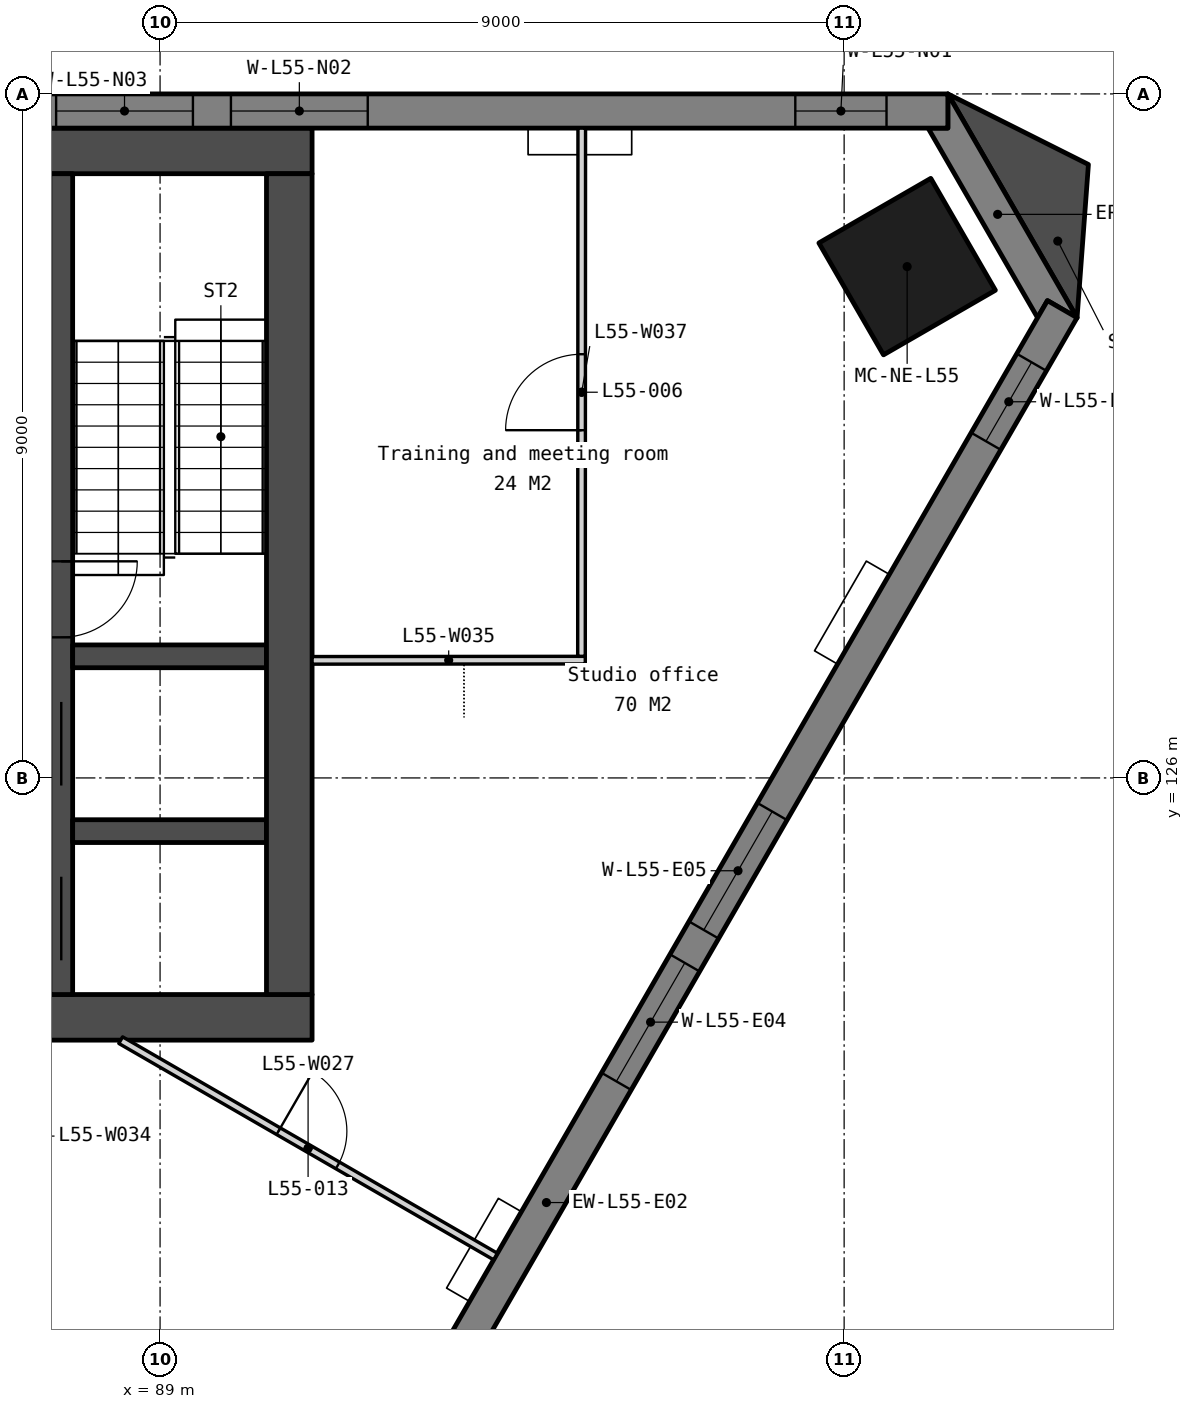
"""IFC4 building model, lengths in metres.
Left out: names, types, materials, properties, quantities, classifications, styles, units other than length and angle.
Written with IfcOpenShell. Run it as: python <this file> out.ifc"""

import sys

from ifc_helpers import new_model, si_unit, direction, frame, frame_2d, origin, origin_2d, place, context, subcontext, project, spatial, polyline, rectangle, outline, extrude, element, fill, save


model = new_model("IFC4")
c1 = context("Model", 3, precision=1e-05, world=origin(), true_north=direction((0.0, 1.0)))
c2 = subcontext(c1, "Body", "Model", "MODEL_VIEW")
j1 = project(units=[si_unit("LENGTHUNIT", "METRE"), si_unit("PLANEANGLEUNIT", "RADIAN")], contexts=[c1])
p1 = place(None, origin())
s1 = spatial("IfcSite", under=j1, at=p1, CompositionType="ELEMENT")
p2 = place(p1, origin())
s2 = spatial("IfcBuilding", under=s1, at=p2, CompositionType="ELEMENT")
p3 = place(p2, frame((0.0, 0.0, 219.2)))
s3 = spatial("IfcBuildingStorey", under=s2, at=p3, CompositionType="ELEMENT", Elevation=219.2)
p4 = place(p3, frame((98.829, 132.728, 0.0), z_axis=(0.0, 0.0, 1.0), x_axis=(-0.5, 0.866025403784, 0.0)))
e1 = element("IfcColumn", 1, at=p4, inside=s3, PredefinedType="COLUMN", context=c2, shape_type="SweptSolid", body=[
    extrude(rectangle(XDim=1.7, YDim=1.7, at=origin_2d()), origin(), (0.0, 0.0, 1.0), 3.9),
])
p5 = place(p3, frame((69.0, 134.25, 0.0), z_axis=(0.0, 0.0, 1.0), x_axis=(1.0, 0.0, 0.0)))
e2 = element("IfcWall", 2, at=p5, inside=s3, PredefinedType="SOLIDWALL", context=c2, shape_type="SweptSolid", body=[
    extrude(rectangle(XDim=22.0, YDim=0.6, at=frame_2d((11.0, 0.0))), origin(), (0.0, 0.0, 1.0), 3.75),
])
p6 = place(p3, frame((69.0, 122.85, 0.0), z_axis=(0.0, 0.0, 1.0), x_axis=(1.0, 0.0, 0.0)))
e3 = element("IfcWall", 3, at=p6, inside=s3, PredefinedType="SOLIDWALL", context=c2, shape_type="SweptSolid", body=[
    extrude(rectangle(XDim=22.0, YDim=0.6, at=frame_2d((11.0, 0.0))), origin(), (0.0, 0.0, 1.0), 3.75),
])
p7 = place(p6, frame((16.375, 0.0, 0.0)))
e4 = element("IfcOpeningElement", 4, at=p7, cuts=e3, PredefinedType="OPENING", context=c2, shape_type="SweptSolid", body=[
    extrude(rectangle(XDim=1.8, YDim=2.1, at=frame_2d((0.9, 1.05))), frame((0.0, 0.31, 0.0), z_axis=(0.0, -1.0, 0.0), x_axis=(1.0, 0.0, 0.0)), (0.0, 0.0, 1.0), 0.62),
])
p8 = place(p6, frame((3.825, 0.0, 0.0)))
e5 = element("IfcOpeningElement", 5, at=p8, cuts=e3, PredefinedType="OPENING", context=c2, shape_type="SweptSolid", body=[
    extrude(rectangle(XDim=1.8, YDim=2.1, at=frame_2d((0.9, 1.05))), frame((0.0, 0.31, 0.0), z_axis=(0.0, -1.0, 0.0), x_axis=(1.0, 0.0, 0.0)), (0.0, 0.0, 1.0), 0.62),
])
p9 = place(p6, frame((12.85, 0.0, 0.0)))
e6 = element("IfcOpeningElement", 6, at=p9, cuts=e3, PredefinedType="OPENING", context=c2, shape_type="SweptSolid", body=[
    extrude(rectangle(XDim=1.5, YDim=2.1, at=frame_2d((0.75, 1.05))), frame((0.0, 0.31, 0.0), z_axis=(0.0, -1.0, 0.0), x_axis=(1.0, 0.0, 0.0)), (0.0, 0.0, 1.0), 0.62),
])
p10 = place(p3, frame((87.7, 133.95, 0.0), z_axis=(0.0, 0.0, 1.0), x_axis=(0.0, -1.0, 0.0)))
e7 = element("IfcWall", 7, at=p10, inside=s3, PredefinedType="SOLIDWALL", context=c2, shape_type="SweptSolid", body=[
    extrude(rectangle(XDim=10.8, YDim=0.3, at=frame_2d((5.4, 0.0))), origin(), (0.0, 0.0, 1.0), 3.75),
])
p11 = place(p10, frame((6.95, 0.0, 0.0)))
e8 = element("IfcOpeningElement", 8, at=p11, cuts=e7, PredefinedType="OPENING", context=c2, shape_type="SweptSolid", body=[
    extrude(rectangle(XDim=1.1, YDim=2.1, at=frame_2d((0.55, 1.05))), frame((0.0, 0.16, 0.0), z_axis=(0.0, -1.0, 0.0), x_axis=(1.0, 0.0, 0.0)), (0.0, 0.0, 1.0), 0.32),
])
p12 = place(p10, frame((5.1, 0.0, 0.0)))
e9 = element("IfcOpeningElement", 9, at=p12, cuts=e7, PredefinedType="OPENING", context=c2, shape_type="SweptSolid", body=[
    extrude(rectangle(XDim=1.0, YDim=2.1, at=frame_2d((0.5, 1.05))), frame((0.0, 0.16, 0.0), z_axis=(0.0, -1.0, 0.0), x_axis=(1.0, 0.0, 0.0)), (0.0, 0.0, 1.0), 0.32),
])
p13 = place(p10, frame((9.25, 0.0, 0.0)))
e10 = element("IfcOpeningElement", 10, at=p13, cuts=e7, PredefinedType="OPENING", context=c2, shape_type="SweptSolid", body=[
    extrude(rectangle(XDim=1.1, YDim=2.1, at=frame_2d((0.55, 1.05))), frame((0.0, 0.16, 0.0), z_axis=(0.0, -1.0, 0.0), x_axis=(1.0, 0.0, 0.0)), (0.0, 0.0, 1.0), 0.32),
])
for number, where, z_axis, x_axis in (
    (11, (87.85, 127.6, 0.0), (0.0, 0.0, 1.0), (1.0, 0.0, 0.0)),
    (12, (87.85, 125.3, 0.0), (0.0, 0.0, 1.0), (1.0, 0.0, 0.0)),
):
    element("IfcWall", number, at=place(p3, frame(where, z_axis=z_axis, x_axis=x_axis)), inside=s3, PredefinedType="SOLIDWALL", context=c2, shape_type="SweptSolid", body=[
        extrude(rectangle(XDim=2.55, YDim=0.3, at=frame_2d((1.275, 0.0))), origin(), (0.0, 0.0, 1.0), 3.75),
    ])
p14 = place(p3, frame((90.7, 133.95, 0.0), z_axis=(0.0, 0.0, 1.0), x_axis=(0.0, -1.0, 0.0)))
e13 = element("IfcWall", 13, at=p14, inside=s3, PredefinedType="SOLIDWALL", context=c2, shape_type="SweptSolid", body=[
    extrude(rectangle(XDim=10.8, YDim=0.6, at=frame_2d((5.4, 0.0))), origin(), (0.0, 0.0, 1.0), 3.75),
])
p15 = place(p3, frame((0.0, 0.0, -0.15)))
e14 = element("IfcWall", 14, at=p15, inside=s3, PredefinedType="SOLIDWALL", context=c2, shape_type="SweptSolid", body=[
    extrude(outline(polyline([(101.065, 132.055), (100.675, 132.281), (100.545, 132.055), (99.105, 134.55), (99.365, 134.55), (99.365, 135.0), (101.065, 132.055)])), origin(), (0.0, 0.0, 1.0), 3.9),
])
p16 = place(p3, frame((99.365, 134.775, -0.15), z_axis=(0.0, 0.0, 1.0), x_axis=(-1.0, 0.0, 0.0)))
e15 = element("IfcWall", 15, at=p16, inside=s3, PredefinedType="SOLIDWALL", context=c2, shape_type="SweptSolid", body=[
    extrude(outline(polyline([(38.729, 0.0), (38.729, 3.9), (0.0, 3.9), (0.0, 0.0), (38.729, 0.0)])), frame((0.0, 0.225, 0.0), z_axis=(0.0, -1.0, 0.0), x_axis=(1.0, 0.0, 0.0)), (0.0, 0.0, 1.0), 0.45),
])
p17 = place(p16, frame((0.807, 0.0, 0.95)))
e16 = element("IfcOpeningElement", 16, at=p17, cuts=e15, PredefinedType="OPENING", context=c2, shape_type="SweptSolid", body=[
    extrude(rectangle(XDim=1.2, YDim=2.2, at=frame_2d((0.6, 1.1))), frame((0.0, 0.235, 0.0), z_axis=(0.0, -1.0, 0.0), x_axis=(1.0, 0.0, 0.0)), (0.0, 0.0, 1.0), 0.47),
])
p18 = place(p16, frame((7.632, 0.0, 0.95)))
e17 = element("IfcOpeningElement", 17, at=p18, cuts=e15, PredefinedType="OPENING", context=c2, shape_type="SweptSolid", body=[
    extrude(rectangle(XDim=1.8, YDim=2.2, at=frame_2d((0.9, 1.1))), frame((0.0, 0.235, 0.0), z_axis=(0.0, -1.0, 0.0), x_axis=(1.0, 0.0, 0.0)), (0.0, 0.0, 1.0), 0.47),
])
p19 = place(p16, frame((9.932, 0.0, 0.95)))
e18 = element("IfcOpeningElement", 18, at=p19, cuts=e15, PredefinedType="OPENING", context=c2, shape_type="SweptSolid", body=[
    extrude(rectangle(XDim=1.8, YDim=2.2, at=frame_2d((0.9, 1.1))), frame((0.0, 0.235, 0.0), z_axis=(0.0, -1.0, 0.0), x_axis=(1.0, 0.0, 0.0)), (0.0, 0.0, 1.0), 0.47),
])
p20 = place(p16, frame((17.315, 0.0, 0.95)))
e19 = element("IfcOpeningElement", 19, at=p20, cuts=e15, PredefinedType="OPENING", context=c2, shape_type="SweptSolid", body=[
    extrude(rectangle(XDim=1.8, YDim=2.2, at=frame_2d((0.9, 1.1))), frame((0.0, 0.235, 0.0), z_axis=(0.0, -1.0, 0.0), x_axis=(1.0, 0.0, 0.0)), (0.0, 0.0, 1.0), 0.47),
])
p21 = place(p16, frame((19.615, 0.0, 0.95)))
e20 = element("IfcOpeningElement", 20, at=p21, cuts=e15, PredefinedType="OPENING", context=c2, shape_type="SweptSolid", body=[
    extrude(rectangle(XDim=1.8, YDim=2.2, at=frame_2d((0.9, 1.1))), frame((0.0, 0.235, 0.0), z_axis=(0.0, -1.0, 0.0), x_axis=(1.0, 0.0, 0.0)), (0.0, 0.0, 1.0), 0.47),
])
p22 = place(p16, frame((26.997, 0.0, 0.95)))
e21 = element("IfcOpeningElement", 21, at=p22, cuts=e15, PredefinedType="OPENING", context=c2, shape_type="SweptSolid", body=[
    extrude(rectangle(XDim=1.8, YDim=2.2, at=frame_2d((0.9, 1.1))), frame((0.0, 0.235, 0.0), z_axis=(0.0, -1.0, 0.0), x_axis=(1.0, 0.0, 0.0)), (0.0, 0.0, 1.0), 0.47),
])
p23 = place(p16, frame((29.297, 0.0, 0.95)))
e22 = element("IfcOpeningElement", 22, at=p23, cuts=e15, PredefinedType="OPENING", context=c2, shape_type="SweptSolid", body=[
    extrude(rectangle(XDim=1.8, YDim=2.2, at=frame_2d((0.9, 1.1))), frame((0.0, 0.235, 0.0), z_axis=(0.0, -1.0, 0.0), x_axis=(1.0, 0.0, 0.0)), (0.0, 0.0, 1.0), 0.47),
])
p24 = place(p16, frame((36.722, 0.0, 0.95)))
e23 = element("IfcOpeningElement", 23, at=p24, cuts=e15, PredefinedType="OPENING", context=c2, shape_type="SweptSolid", body=[
    extrude(rectangle(XDim=1.2, YDim=2.2, at=frame_2d((0.6, 1.1))), frame((0.0, 0.235, 0.0), z_axis=(0.0, -1.0, 0.0), x_axis=(1.0, 0.0, 0.0)), (0.0, 0.0, 1.0), 0.47),
])
p25 = place(p3, frame((87.296, 108.658, -0.15), z_axis=(0.0, 0.0, 1.0), x_axis=(0.500003227337, 0.866023540472, 0.0)))
e24 = element("IfcWall", 24, at=p25, inside=s3, PredefinedType="SOLIDWALL", context=c2, shape_type="SweptSolid", body=[
    extrude(outline(polyline([(27.147, 3.9), (27.147, 0.0), (0.0, 0.0), (0.0, 3.9), (27.147, 3.9)])), frame((0.0, 0.225, 0.0), z_axis=(0.0, -1.0, 0.0), x_axis=(1.0, 0.0, 0.0)), (0.0, 0.0, 1.0), 0.45),
])
p26 = place(p25, frame((5.732, 0.0, 0.95)))
e25 = element("IfcOpeningElement", 25, at=p26, cuts=e24, PredefinedType="OPENING", context=c2, shape_type="SweptSolid", body=[
    extrude(rectangle(XDim=1.8, YDim=2.2, at=frame_2d((0.9, 1.1))), frame((0.0, 0.235, 0.0), z_axis=(0.0, -1.0, 0.0), x_axis=(1.0, 0.0, 0.0)), (0.0, 0.0, 1.0), 0.47),
])
p27 = place(p25, frame((8.032, 0.0, 0.95)))
e26 = element("IfcOpeningElement", 26, at=p27, cuts=e24, PredefinedType="OPENING", context=c2, shape_type="SweptSolid", body=[
    extrude(rectangle(XDim=1.8, YDim=2.2, at=frame_2d((0.9, 1.1))), frame((0.0, 0.235, 0.0), z_axis=(0.0, -1.0, 0.0), x_axis=(1.0, 0.0, 0.0)), (0.0, 0.0, 1.0), 0.47),
])
p28 = place(p25, frame((15.415, 0.0, 0.95)))
e27 = element("IfcOpeningElement", 27, at=p28, cuts=e24, PredefinedType="OPENING", context=c2, shape_type="SweptSolid", body=[
    extrude(rectangle(XDim=1.8, YDim=2.2, at=frame_2d((0.9, 1.1))), frame((0.0, 0.235, 0.0), z_axis=(0.0, -1.0, 0.0), x_axis=(1.0, 0.0, 0.0)), (0.0, 0.0, 1.0), 0.47),
])
p29 = place(p25, frame((17.715, 0.0, 0.95)))
e28 = element("IfcOpeningElement", 28, at=p29, cuts=e24, PredefinedType="OPENING", context=c2, shape_type="SweptSolid", body=[
    extrude(rectangle(XDim=1.8, YDim=2.2, at=frame_2d((0.9, 1.1))), frame((0.0, 0.235, 0.0), z_axis=(0.0, -1.0, 0.0), x_axis=(1.0, 0.0, 0.0)), (0.0, 0.0, 1.0), 0.47),
])
p30 = place(p25, frame((25.14, 0.0, 0.95)))
e29 = element("IfcOpeningElement", 29, at=p30, cuts=e24, PredefinedType="OPENING", context=c2, shape_type="SweptSolid", body=[
    extrude(rectangle(XDim=1.2, YDim=2.2, at=frame_2d((0.6, 1.1))), frame((0.0, 0.235, 0.0), z_axis=(0.0, -1.0, 0.0), x_axis=(1.0, 0.0, 0.0)), (0.0, 0.0, 1.0), 0.47),
])
p31 = place(p3, frame((0.0, 0.0, -0.15)))
e30 = element("IfcWall", 30, at=p31, inside=s3, PredefinedType="SOLIDWALL", context=c2, shape_type="SweptSolid", body=[
    extrude(outline(polyline([(101.065, 132.055), (101.214, 134.072), (99.365, 135.0), (101.065, 132.055)])), origin(), (0.0, 0.0, 1.0), 3.9),
])
p32 = place(p3, frame((84.346, 119.348, 0.0), z_axis=(0.0, 0.0, 1.0), x_axis=(0.866037793621, -0.49997853956, 0.0)))
e31 = element("IfcWall", 31, at=p32, inside=s3, PredefinedType="PARTITIONING", context=c2, shape_type="SweptSolid", body=[
    extrude(rectangle(XDim=6.162, YDim=0.2, at=frame_2d((3.081, 0.0))), origin(), (0.0, 0.0, 1.0), 3.75),
])
p33 = place(p3, frame((88.482, 122.55, 0.0), z_axis=(0.0, 0.0, 1.0), x_axis=(0.866023511746, -0.500003277092, 0.0)))
e32 = element("IfcWall", 32, at=p33, inside=s3, PredefinedType="PARTITIONING", context=c2, shape_type="SweptSolid", body=[
    extrude(rectangle(XDim=5.694, YDim=0.1, at=frame_2d((2.847, 0.0))), origin(), (0.0, 0.0, 1.0), 3.75),
])
p34 = place(p33, frame((2.397, 0.0, 0.0)))
e33 = element("IfcOpeningElement", 33, at=p34, cuts=e32, PredefinedType="OPENING", context=c2, shape_type="SweptSolid", body=[
    extrude(rectangle(XDim=0.9, YDim=2.1, at=frame_2d((0.45, 1.05))), frame((0.0, 0.06, 0.0), z_axis=(0.0, -1.0, 0.0), x_axis=(1.0, 0.0, 0.0)), (0.0, 0.0, 1.0), 0.12),
])
p35 = place(p3, frame((91.0, 127.547, 0.0), z_axis=(0.0, 0.0, 1.0), x_axis=(0.999999667846, 0.00081505101, 0.0)))
e34 = element("IfcWall", 34, at=p35, inside=s3, PredefinedType="PARTITIONING", context=c2, shape_type="SweptSolid", body=[
    extrude(rectangle(XDim=3.594, YDim=0.1, at=frame_2d((1.797, 0.0))), origin(), (0.0, 0.0, 1.0), 3.75),
])
p36 = place(p3, frame((94.544, 127.6, 0.0), z_axis=(0.0, 0.0, 1.0), x_axis=(0.000491814737, 0.999999879059, 0.0)))
e35 = element("IfcWall", 35, at=p36, inside=s3, PredefinedType="PARTITIONING", context=c2, shape_type="SweptSolid", body=[
    extrude(rectangle(XDim=6.95, YDim=0.1, at=frame_2d((3.475, 0.0))), origin(), (0.0, 0.0, 1.0), 3.75),
])
p37 = place(p36, frame((2.975, 0.0, 0.0)))
e36 = element("IfcOpeningElement", 36, at=p37, cuts=e35, PredefinedType="OPENING", context=c2, shape_type="SweptSolid", body=[
    extrude(rectangle(XDim=1.0, YDim=2.1, at=frame_2d((0.5, 1.05))), frame((0.0, 0.06, 0.0), z_axis=(0.0, -1.0, 0.0), x_axis=(1.0, 0.0, 0.0)), (0.0, 0.0, 1.0), 0.12),
])
p38 = place(p11, origin())
e37 = element("IfcDoor", 37, at=p38, inside=s3, OperationType="SLIDING_TO_LEFT", PredefinedType="DOOR", context=c2, shape_type="SweptSolid", body=[
    extrude(rectangle(XDim=1.1, YDim=2.1, at=frame_2d((0.55, 1.05))), frame((0.0, 0.025, 0.0), z_axis=(0.0, -1.0, 0.0), x_axis=(1.0, 0.0, 0.0)), (0.0, 0.0, 1.0), 0.05),
])
fill(e8, e37)
p39 = place(p12, origin())
e38 = element("IfcDoor", 38, at=p39, inside=s3, OperationType="SINGLE_SWING_LEFT", PredefinedType="DOOR", context=c2, shape_type="SweptSolid", body=[
    extrude(rectangle(XDim=1.0, YDim=2.1, at=frame_2d((0.5, 1.05))), frame((0.0, 0.025, 0.0), z_axis=(0.0, -1.0, 0.0), x_axis=(1.0, 0.0, 0.0)), (0.0, 0.0, 1.0), 0.05),
])
fill(e9, e38)
p40 = place(p13, origin())
e39 = element("IfcDoor", 39, at=p40, inside=s3, OperationType="SLIDING_TO_LEFT", PredefinedType="DOOR", context=c2, shape_type="SweptSolid", body=[
    extrude(rectangle(XDim=1.1, YDim=2.1, at=frame_2d((0.55, 1.05))), frame((0.0, 0.025, 0.0), z_axis=(0.0, -1.0, 0.0), x_axis=(1.0, 0.0, 0.0)), (0.0, 0.0, 1.0), 0.05),
])
fill(e10, e39)
p41 = place(p17, origin())
e40 = element("IfcWindow", 40, at=p41, inside=s3, PartitioningType="SINGLE_PANEL", PredefinedType="WINDOW", context=c2, shape_type="SweptSolid", body=[
    extrude(rectangle(XDim=1.2, YDim=2.2, at=frame_2d((0.6, 1.1))), frame((0.0, 0.03, 0.0), z_axis=(0.0, -1.0, 0.0), x_axis=(1.0, 0.0, 0.0)), (0.0, 0.0, 1.0), 0.06),
])
fill(e16, e40)
p42 = place(p18, origin())
e41 = element("IfcWindow", 41, at=p42, inside=s3, PartitioningType="SINGLE_PANEL", PredefinedType="WINDOW", context=c2, shape_type="SweptSolid", body=[
    extrude(rectangle(XDim=1.8, YDim=2.2, at=frame_2d((0.9, 1.1))), frame((0.0, 0.03, 0.0), z_axis=(0.0, -1.0, 0.0), x_axis=(1.0, 0.0, 0.0)), (0.0, 0.0, 1.0), 0.06),
])
fill(e17, e41)
p43 = place(p19, origin())
e42 = element("IfcWindow", 42, at=p43, inside=s3, PartitioningType="SINGLE_PANEL", PredefinedType="WINDOW", context=c2, shape_type="SweptSolid", body=[
    extrude(rectangle(XDim=1.8, YDim=2.2, at=frame_2d((0.9, 1.1))), frame((0.0, 0.03, 0.0), z_axis=(0.0, -1.0, 0.0), x_axis=(1.0, 0.0, 0.0)), (0.0, 0.0, 1.0), 0.06),
])
fill(e18, e42)
p44 = place(p28, origin())
e43 = element("IfcWindow", 43, at=p44, inside=s3, PartitioningType="SINGLE_PANEL", PredefinedType="WINDOW", context=c2, shape_type="SweptSolid", body=[
    extrude(rectangle(XDim=1.8, YDim=2.2, at=frame_2d((0.9, 1.1))), frame((0.0, 0.03, 0.0), z_axis=(0.0, -1.0, 0.0), x_axis=(1.0, 0.0, 0.0)), (0.0, 0.0, 1.0), 0.06),
])
fill(e27, e43)
p45 = place(p29, origin())
e44 = element("IfcWindow", 44, at=p45, inside=s3, PartitioningType="SINGLE_PANEL", PredefinedType="WINDOW", context=c2, shape_type="SweptSolid", body=[
    extrude(rectangle(XDim=1.8, YDim=2.2, at=frame_2d((0.9, 1.1))), frame((0.0, 0.03, 0.0), z_axis=(0.0, -1.0, 0.0), x_axis=(1.0, 0.0, 0.0)), (0.0, 0.0, 1.0), 0.06),
])
fill(e28, e44)
p46 = place(p30, origin())
e45 = element("IfcWindow", 45, at=p46, inside=s3, PartitioningType="SINGLE_PANEL", PredefinedType="WINDOW", context=c2, shape_type="SweptSolid", body=[
    extrude(rectangle(XDim=1.2, YDim=2.2, at=frame_2d((0.6, 1.1))), frame((0.0, 0.03, 0.0), z_axis=(0.0, -1.0, 0.0), x_axis=(1.0, 0.0, 0.0)), (0.0, 0.0, 1.0), 0.06),
])
fill(e29, e45)
p47 = place(p37, origin())
e46 = element("IfcDoor", 46, at=p47, inside=s3, OperationType="SINGLE_SWING_LEFT", PredefinedType="DOOR", context=c2, shape_type="SweptSolid", body=[
    extrude(rectangle(XDim=1.0, YDim=2.1, at=frame_2d((0.5, 1.05))), frame((0.0, 0.025, 0.0), z_axis=(0.0, -1.0, 0.0), x_axis=(1.0, 0.0, 0.0)), (0.0, 0.0, 1.0), 0.05),
])
fill(e36, e46)
p48 = place(p34, origin())
e47 = element("IfcDoor", 47, at=p48, inside=s3, OperationType="SINGLE_SWING_LEFT", PredefinedType="DOOR", context=c2, shape_type="SweptSolid", body=[
    extrude(rectangle(XDim=0.9, YDim=2.1, at=frame_2d((0.45, 1.05))), frame((0.0, 0.025, 0.0), z_axis=(0.0, -1.0, 0.0), x_axis=(1.0, 0.0, 0.0)), (0.0, 0.0, 1.0), 0.05),
])
fill(e33, e47)
save(model, sys.argv[1])
